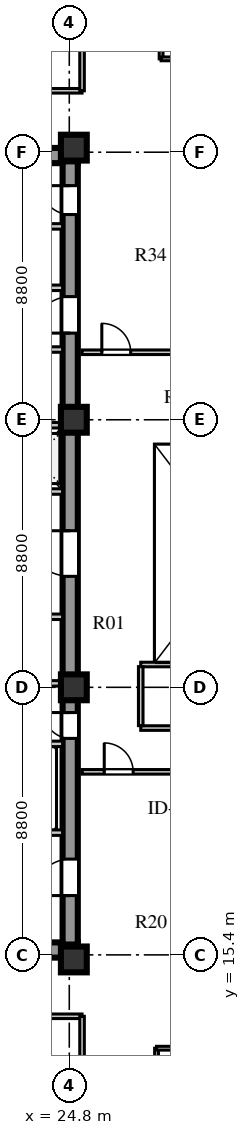
"""IFC4 building model, lengths in metres.
Left out: names, types, materials, properties, quantities, classifications, styles, units other than length and angle.
Written with IfcOpenShell. Run it as: python <this file> out.ifc"""

import sys

from ifc_helpers import new_model, si_unit, direction, frame, frame_2d, origin, origin_2d, place, context, subcontext, project, spatial, rectangle, extrude, element, fill, save


model = new_model("IFC4")
c1 = context("Model", 3, precision=1e-05, world=origin(), true_north=direction((0.0, 1.0)))
c2 = subcontext(c1, "Body", "Model", "MODEL_VIEW")
j1 = project(units=[si_unit("LENGTHUNIT", "METRE"), si_unit("PLANEANGLEUNIT", "RADIAN")], contexts=[c1])
p1 = place(None, origin())
s1 = spatial("IfcSite", under=j1, at=p1, CompositionType="ELEMENT")
p2 = place(p1, origin())
s2 = spatial("IfcBuilding", under=s1, at=p2, CompositionType="ELEMENT")
p3 = place(p2, frame((0.0, 0.0, 127.1)))
s3 = spatial("IfcBuildingStorey", under=s2, at=p3, CompositionType="ELEMENT", Elevation=127.1)
for number, where, z_axis, x_axis in (
    (1, (15.4, 15.56, 0.0), (0.0, 0.0, 1.0), (1.0, 0.0, 0.0)),
    (2, (15.4, 41.69, 0.0), (0.0, 0.0, 1.0), (1.0, 0.0, 0.0)),
):
    element("IfcWall", number, at=place(p3, frame(where, z_axis=z_axis, x_axis=x_axis)), inside=s3, PredefinedType="SHEAR", context=c2, shape_type="SweptSolid", body=[
        extrude(rectangle(XDim=9.68, YDim=0.5, at=frame_2d((4.84, 0.0))), origin(), (0.0, 0.0, 1.0), 3.6),
    ])
p4 = place(p3, frame((24.83, 15.74, 0.0), z_axis=(0.0, 0.0, 1.0), x_axis=(0.0, 1.0, 0.0)))
e3 = element("IfcWall", 3, at=p4, inside=s3, PredefinedType="SHEAR", context=c2, shape_type="SweptSolid", body=[
    extrude(rectangle(XDim=25.76, YDim=0.5, at=frame_2d((12.88, 0.0))), origin(), (0.0, 0.0, 1.0), 3.6),
])
p5 = place(p4, frame((1.61, 0.0, 0.0)))
e4 = element("IfcOpeningElement", 4, at=p5, cuts=e3, PredefinedType="OPENING", context=c2, shape_type="SweptSolid", body=[
    extrude(rectangle(XDim=1.2, YDim=2.1, at=frame_2d((0.6, 1.05))), frame((0.0, 0.26, 0.0), z_axis=(0.0, -1.0, 0.0), x_axis=(1.0, 0.0, 0.0)), (0.0, 0.0, 1.0), 0.52),
])
p6 = place(p4, frame((6.78, 0.0, 0.0)))
e5 = element("IfcOpeningElement", 5, at=p6, cuts=e3, PredefinedType="OPENING", context=c2, shape_type="SweptSolid", body=[
    extrude(rectangle(XDim=0.85, YDim=2.06, at=frame_2d((0.425, 1.03))), frame((0.0, 0.26, 0.0), z_axis=(0.0, -1.0, 0.0), x_axis=(1.0, 0.0, 0.0)), (0.0, 0.0, 1.0), 0.52),
])
p7 = place(p4, frame((12.11, 0.0, 0.0)))
e6 = element("IfcOpeningElement", 6, at=p7, cuts=e3, PredefinedType="OPENING", context=c2, shape_type="SweptSolid", body=[
    extrude(rectangle(XDim=1.5, YDim=2.12, at=frame_2d((0.75, 1.06))), frame((0.0, 0.26, 0.0), z_axis=(0.0, -1.0, 0.0), x_axis=(1.0, 0.0, 0.0)), (0.0, 0.0, 1.0), 0.52),
])
p8 = place(p4, frame((20.11, 0.0, 0.0)))
e7 = element("IfcOpeningElement", 7, at=p8, cuts=e3, PredefinedType="OPENING", context=c2, shape_type="SweptSolid", body=[
    extrude(rectangle(XDim=1.2, YDim=2.12, at=frame_2d((0.6, 1.06))), frame((0.0, 0.26, 0.0), z_axis=(0.0, -1.0, 0.0), x_axis=(1.0, 0.0, 0.0)), (0.0, 0.0, 1.0), 0.52),
])
p9 = place(p4, frame((24.01, 0.0, 0.0)))
e8 = element("IfcOpeningElement", 8, at=p9, cuts=e3, PredefinedType="OPENING", context=c2, shape_type="SweptSolid", body=[
    extrude(rectangle(XDim=0.95, YDim=2.1, at=frame_2d((0.475, 1.05))), frame((0.0, 0.26, 0.0), z_axis=(0.0, -1.0, 0.0), x_axis=(1.0, 0.0, 0.0)), (0.0, 0.0, 1.0), 0.52),
])
for number, where, z_axis, x_axis in (
    (9, (24.95, 15.25, 0.0), (0.0, 0.0, 1.0), (1.0, 0.0, 0.0)),
    (10, (24.95, 24.2, 0.0), (0.0, 0.0, 1.0), (1.0, 0.0, 0.0)),
    (11, (24.95, 33.0, 0.0), (0.0, 0.0, 1.0), (1.0, 0.0, 0.0)),
    (12, (24.95, 41.95, 0.0), (0.0, 0.0, 1.0), (1.0, 0.0, 0.0)),
):
    element("IfcColumn", number, at=place(p3, frame(where, z_axis=z_axis, x_axis=x_axis)), inside=s3, PredefinedType="COLUMN", context=c2, shape_type="SweptSolid", body=[
        extrude(rectangle(XDim=0.85, YDim=0.85, at=origin_2d()), origin(), (0.0, 0.0, 1.0), 3.6),
    ])
p10 = place(p3, frame((19.64, 19.42, 0.0), z_axis=(0.0, 0.0, 1.0), x_axis=(1.0, 0.0, 0.0)))
e13 = element("IfcWall", 13, at=p10, inside=s3, PredefinedType="SOLIDWALL", context=c2, shape_type="SweptSolid", body=[
    extrude(rectangle(XDim=4.94, YDim=0.18, at=frame_2d((2.47, 0.0))), origin(), (0.0, 0.0, 1.0), 3.6),
])
p11 = place(p10, frame((0.72, 0.0, 0.0)))
e14 = element("IfcOpeningElement", 14, at=p11, cuts=e13, PredefinedType="OPENING", context=c2, shape_type="SweptSolid", body=[
    extrude(rectangle(XDim=1.1, YDim=2.1, at=frame_2d((0.55, 1.05))), frame((0.0, 0.1, 0.0), z_axis=(0.0, -1.0, 0.0), x_axis=(1.0, 0.0, 0.0)), (0.0, 0.0, 1.0), 0.2),
])
p12 = place(p10, frame((3.02, 0.0, 0.0)))
e15 = element("IfcOpeningElement", 15, at=p12, cuts=e13, PredefinedType="OPENING", context=c2, shape_type="SweptSolid", body=[
    extrude(rectangle(XDim=1.1, YDim=2.1, at=frame_2d((0.55, 1.05))), frame((0.0, 0.1, 0.0), z_axis=(0.0, -1.0, 0.0), x_axis=(1.0, 0.0, 0.0)), (0.0, 0.0, 1.0), 0.2),
])
p13 = place(p3, frame((19.64, 22.34, 0.0), z_axis=(0.0, 0.0, 1.0), x_axis=(1.0, 0.0, 0.0)))
e16 = element("IfcWall", 16, at=p13, inside=s3, PredefinedType="SOLIDWALL", context=c2, shape_type="SweptSolid", body=[
    extrude(rectangle(XDim=4.94, YDim=0.18, at=frame_2d((2.47, 0.0))), origin(), (0.0, 0.0, 1.0), 3.6),
])
p14 = place(p3, frame((15.9, 26.52, 0.0), z_axis=(0.0, 0.0, 1.0), x_axis=(1.0, 0.0, 0.0)))
e17 = element("IfcWall", 17, at=p14, inside=s3, PredefinedType="SOLIDWALL", context=c2, shape_type="SweptSolid", body=[
    extrude(rectangle(XDim=8.68, YDim=0.18, at=frame_2d((4.34, 0.0))), origin(), (0.0, 0.0, 1.0), 3.6),
])
p15 = place(p14, frame((3.3, 0.0, 0.0)))
e18 = element("IfcOpeningElement", 18, at=p15, cuts=e17, PredefinedType="OPENING", context=c2, shape_type="SweptSolid", body=[
    extrude(rectangle(XDim=0.95, YDim=2.1, at=frame_2d((0.475, 1.05))), frame((0.0, 0.1, 0.0), z_axis=(0.0, -1.0, 0.0), x_axis=(1.0, 0.0, 0.0)), (0.0, 0.0, 1.0), 0.2),
])
p16 = place(p3, frame((15.9, 24.33, 0.0), z_axis=(0.0, 0.0, 1.0), x_axis=(1.0, 0.0, 0.0)))
e19 = element("IfcWall", 19, at=p16, inside=s3, PredefinedType="SOLIDWALL", context=c2, shape_type="SweptSolid", body=[
    extrude(rectangle(XDim=8.68, YDim=0.18, at=frame_2d((4.34, 0.0))), origin(), (0.0, 0.0, 1.0), 2.95),
])
p17 = place(p3, frame((15.9, 30.64, 0.0), z_axis=(0.0, 0.0, 1.0), x_axis=(1.0, 0.0, 0.0)))
e20 = element("IfcWall", 20, at=p17, inside=s3, PredefinedType="SOLIDWALL", context=c2, shape_type="SweptSolid", body=[
    extrude(rectangle(XDim=8.68, YDim=0.18, at=frame_2d((4.34, 0.0))), origin(), (0.0, 0.0, 1.0), 3.6),
])
p18 = place(p17, frame((1.76, 0.0, 0.0)))
e21 = element("IfcOpeningElement", 21, at=p18, cuts=e20, PredefinedType="OPENING", context=c2, shape_type="SweptSolid", body=[
    extrude(rectangle(XDim=1.0, YDim=2.1, at=frame_2d((0.5, 1.05))), frame((0.0, 0.1, 0.0), z_axis=(0.0, -1.0, 0.0), x_axis=(1.0, 0.0, 0.0)), (0.0, 0.0, 1.0), 0.2),
])
p19 = place(p17, frame((3.6, 0.0, 0.0)))
e22 = element("IfcOpeningElement", 22, at=p19, cuts=e20, PredefinedType="OPENING", context=c2, shape_type="SweptSolid", body=[
    extrude(rectangle(XDim=1.0, YDim=2.1, at=frame_2d((0.5, 1.05))), frame((0.0, 0.1, 0.0), z_axis=(0.0, -1.0, 0.0), x_axis=(1.0, 0.0, 0.0)), (0.0, 0.0, 1.0), 0.2),
])
p20 = place(p17, frame((5.44, 0.0, 0.0)))
e23 = element("IfcOpeningElement", 23, at=p20, cuts=e20, PredefinedType="OPENING", context=c2, shape_type="SweptSolid", body=[
    extrude(rectangle(XDim=1.0, YDim=2.1, at=frame_2d((0.5, 1.05))), frame((0.0, 0.1, 0.0), z_axis=(0.0, -1.0, 0.0), x_axis=(1.0, 0.0, 0.0)), (0.0, 0.0, 1.0), 0.2),
])
p21 = place(p17, frame((7.28, 0.0, 0.0)))
e24 = element("IfcOpeningElement", 24, at=p21, cuts=e20, PredefinedType="OPENING", context=c2, shape_type="SweptSolid", body=[
    extrude(rectangle(XDim=1.0, YDim=2.1, at=frame_2d((0.5, 1.05))), frame((0.0, 0.1, 0.0), z_axis=(0.0, -1.0, 0.0), x_axis=(1.0, 0.0, 0.0)), (0.0, 0.0, 1.0), 0.2),
])
p22 = place(p3, frame((15.9, 32.82, 0.0), z_axis=(0.0, 0.0, 1.0), x_axis=(1.0, 0.0, 0.0)))
e25 = element("IfcWall", 25, at=p22, inside=s3, PredefinedType="SOLIDWALL", context=c2, shape_type="SweptSolid", body=[
    extrude(rectangle(XDim=8.68, YDim=0.18, at=frame_2d((4.34, 0.0))), origin(), (0.0, 0.0, 1.0), 2.95),
])
p23 = place(p3, frame((22.02, 35.31, 0.0), z_axis=(0.0, 0.0, 1.0), x_axis=(1.0, 0.0, 0.0)))
e26 = element("IfcWall", 26, at=p23, inside=s3, PredefinedType="SOLIDWALL", context=c2, shape_type="SweptSolid", body=[
    extrude(rectangle(XDim=2.56, YDim=0.18, at=frame_2d((1.28, 0.0))), origin(), (0.0, 0.0, 1.0), 3.6),
])
p24 = place(p23, frame((0.55, 0.0, 0.0)))
e27 = element("IfcOpeningElement", 27, at=p24, cuts=e26, PredefinedType="OPENING", context=c2, shape_type="SweptSolid", body=[
    extrude(rectangle(XDim=1.0, YDim=2.1, at=frame_2d((0.5, 1.05))), frame((0.0, 0.1, 0.0), z_axis=(0.0, -1.0, 0.0), x_axis=(1.0, 0.0, 0.0)), (0.0, 0.0, 1.0), 0.2),
])
p25 = place(p3, frame((19.64, 37.34, 0.0), z_axis=(0.0, 0.0, 1.0), x_axis=(1.0, 0.0, 0.0)))
e28 = element("IfcWall", 28, at=p25, inside=s3, PredefinedType="SOLIDWALL", context=c2, shape_type="SweptSolid", body=[
    extrude(rectangle(XDim=4.94, YDim=0.18, at=frame_2d((2.47, 0.0))), origin(), (0.0, 0.0, 1.0), 3.6),
])
p26 = place(p25, frame((0.45, 0.0, 0.0)))
e29 = element("IfcOpeningElement", 29, at=p26, cuts=e28, PredefinedType="OPENING", context=c2, shape_type="SweptSolid", body=[
    extrude(rectangle(XDim=1.0, YDim=2.1, at=frame_2d((0.5, 1.05))), frame((0.0, 0.1, 0.0), z_axis=(0.0, -1.0, 0.0), x_axis=(1.0, 0.0, 0.0)), (0.0, 0.0, 1.0), 0.2),
])
p27 = place(p25, frame((2.5, 0.0, 0.0)))
e30 = element("IfcOpeningElement", 30, at=p27, cuts=e28, PredefinedType="OPENING", context=c2, shape_type="SweptSolid", body=[
    extrude(rectangle(XDim=1.0, YDim=2.1, at=frame_2d((0.5, 1.05))), frame((0.0, 0.1, 0.0), z_axis=(0.0, -1.0, 0.0), x_axis=(1.0, 0.0, 0.0)), (0.0, 0.0, 1.0), 0.2),
])
p28 = place(p3, frame((19.64, 39.36, 0.0), z_axis=(0.0, 0.0, 1.0), x_axis=(1.0, 0.0, 0.0)))
e31 = element("IfcWall", 31, at=p28, inside=s3, PredefinedType="SOLIDWALL", context=c2, shape_type="SweptSolid", body=[
    extrude(rectangle(XDim=4.94, YDim=0.18, at=frame_2d((2.47, 0.0))), origin(), (0.0, 0.0, 1.0), 3.6),
])
p29 = place(p3, frame((25.22, 21.42, 0.0), z_axis=(0.0, 0.0, 1.0), x_axis=(1.0, 0.0, 0.0)))
e32 = element("IfcWall", 32, at=p29, inside=s3, PredefinedType="PARTITIONING", context=c2, shape_type="SweptSolid", body=[
    extrude(rectangle(XDim=15.6, YDim=0.15, at=frame_2d((7.8, 0.0))), origin(), (0.0, 0.0, 1.0), 3.2),
])
p30 = place(p29, frame((0.73, 0.0, 0.0)))
e33 = element("IfcOpeningElement", 33, at=p30, cuts=e32, PredefinedType="OPENING", context=c2, shape_type="SweptSolid", body=[
    extrude(rectangle(XDim=0.95, YDim=2.1, at=frame_2d((0.475, 1.05))), frame((0.0, 0.085, 0.0), z_axis=(0.0, -1.0, 0.0), x_axis=(1.0, 0.0, 0.0)), (0.0, 0.0, 1.0), 0.17),
])
p31 = place(p29, frame((5.23, 0.0, 0.0)))
e34 = element("IfcOpeningElement", 34, at=p31, cuts=e32, PredefinedType="OPENING", context=c2, shape_type="SweptSolid", body=[
    extrude(rectangle(XDim=0.95, YDim=2.1, at=frame_2d((0.475, 1.05))), frame((0.0, 0.085, 0.0), z_axis=(0.0, -1.0, 0.0), x_axis=(1.0, 0.0, 0.0)), (0.0, 0.0, 1.0), 0.17),
])
p32 = place(p29, frame((10.83, 0.0, 0.0)))
e35 = element("IfcOpeningElement", 35, at=p32, cuts=e32, PredefinedType="OPENING", context=c2, shape_type="SweptSolid", body=[
    extrude(rectangle(XDim=0.95, YDim=2.1, at=frame_2d((0.475, 1.05))), frame((0.0, 0.085, 0.0), z_axis=(0.0, -1.0, 0.0), x_axis=(1.0, 0.0, 0.0)), (0.0, 0.0, 1.0), 0.17),
])
p33 = place(p3, frame((27.15, 22.86, 0.0), z_axis=(0.0, 0.0, 1.0), x_axis=(1.0, 0.0, 0.0)))
e36 = element("IfcWall", 36, at=p33, inside=s3, PredefinedType="PARTITIONING", context=c2, shape_type="SweptSolid", body=[
    extrude(rectangle(XDim=13.67, YDim=0.15, at=frame_2d((6.835, 0.0))), origin(), (0.0, 0.0, 1.0), 3.6),
])
p34 = place(p33, frame((2.2, 0.0, 0.0)))
e37 = element("IfcOpeningElement", 37, at=p34, cuts=e36, PredefinedType="OPENING", context=c2, shape_type="SweptSolid", body=[
    extrude(rectangle(XDim=0.9, YDim=2.08, at=frame_2d((0.45, 1.04))), frame((0.0, 0.085, 0.0), z_axis=(0.0, -1.0, 0.0), x_axis=(1.0, 0.0, 0.0)), (0.0, 0.0, 1.0), 0.17),
])
p35 = place(p3, frame((25.22, 35.22, 0.0), z_axis=(0.0, 0.0, 1.0), x_axis=(1.0, 0.0, 0.0)))
e38 = element("IfcWall", 38, at=p35, inside=s3, PredefinedType="PARTITIONING", context=c2, shape_type="SweptSolid", body=[
    extrude(rectangle(XDim=9.5, YDim=0.15, at=frame_2d((4.75, 0.0))), origin(), (0.0, 0.0, 1.0), 3.6),
])
p36 = place(p35, frame((0.65, 0.0, 0.0)))
e39 = element("IfcOpeningElement", 39, at=p36, cuts=e38, PredefinedType="OPENING", context=c2, shape_type="SweptSolid", body=[
    extrude(rectangle(XDim=0.95, YDim=2.1, at=frame_2d((0.475, 1.05))), frame((0.0, 0.085, 0.0), z_axis=(0.0, -1.0, 0.0), x_axis=(1.0, 0.0, 0.0)), (0.0, 0.0, 1.0), 0.17),
])
p37 = place(p35, frame((5.2, 0.0, 0.0)))
e40 = element("IfcOpeningElement", 40, at=p37, cuts=e38, PredefinedType="OPENING", context=c2, shape_type="SweptSolid", body=[
    extrude(rectangle(XDim=0.95, YDim=2.1, at=frame_2d((0.475, 1.05))), frame((0.0, 0.085, 0.0), z_axis=(0.0, -1.0, 0.0), x_axis=(1.0, 0.0, 0.0)), (0.0, 0.0, 1.0), 0.17),
])
p38 = place(p3, frame((13.59, 13.38, 0.0), z_axis=(0.0, 0.0, 1.0), x_axis=(1.0, 0.0, 0.0)))
e41 = element("IfcWall", 41, at=p38, inside=s3, PredefinedType="PARTITIONING", context=c2, shape_type="SweptSolid", body=[
    extrude(rectangle(XDim=11.63, YDim=0.15, at=frame_2d((5.815, 0.0))), origin(), (0.0, 0.0, 1.0), 3.6),
])
p39 = place(p38, frame((4.56, 0.0, 0.0)))
e42 = element("IfcOpeningElement", 42, at=p39, cuts=e41, PredefinedType="OPENING", context=c2, shape_type="SweptSolid", body=[
    extrude(rectangle(XDim=1.0, YDim=2.08, at=frame_2d((0.5, 1.04))), frame((0.0, 0.085, 0.0), z_axis=(0.0, -1.0, 0.0), x_axis=(1.0, 0.0, 0.0)), (0.0, 0.0, 1.0), 0.17),
])
p40 = place(p3, frame((25.22, 10.28, 0.0), z_axis=(0.0, 0.0, 1.0), x_axis=(0.0, 1.0, 0.0)))
e43 = element("IfcWall", 43, at=p40, inside=s3, PredefinedType="PARTITIONING", context=c2, shape_type="SweptSolid", body=[
    extrude(rectangle(XDim=3.1, YDim=0.15, at=frame_2d((1.55, 0.0))), origin(), (0.0, 0.0, 1.0), 3.1),
])
p41 = place(p3, frame((13.59, 43.82, 0.0), z_axis=(0.0, 0.0, 1.0), x_axis=(1.0, 0.0, 0.0)))
e44 = element("IfcWall", 44, at=p41, inside=s3, PredefinedType="PARTITIONING", context=c2, shape_type="SweptSolid", body=[
    extrude(rectangle(XDim=11.63, YDim=0.15, at=frame_2d((5.815, 0.0))), origin(), (0.0, 0.0, 1.0), 3.6),
])
p42 = place(p41, frame((4.56, 0.0, 0.0)))
e45 = element("IfcOpeningElement", 45, at=p42, cuts=e44, PredefinedType="OPENING", context=c2, shape_type="SweptSolid", body=[
    extrude(rectangle(XDim=1.0, YDim=2.08, at=frame_2d((0.5, 1.04))), frame((0.0, 0.085, 0.0), z_axis=(0.0, -1.0, 0.0), x_axis=(1.0, 0.0, 0.0)), (0.0, 0.0, 1.0), 0.17),
])
p43 = place(p3, frame((25.22, 43.82, 0.0), z_axis=(0.0, 0.0, 1.0), x_axis=(0.0, 1.0, 0.0)))
e46 = element("IfcWall", 46, at=p43, inside=s3, PredefinedType="PARTITIONING", context=c2, shape_type="SweptSolid", body=[
    extrude(rectangle(XDim=3.1, YDim=0.15, at=frame_2d((1.55, 0.0))), origin(), (0.0, 0.0, 1.0), 3.1),
])
p44 = place(p3, frame((27.15, 24.95, 0.0), z_axis=(0.0, 0.0, 1.0), x_axis=(1.0, 0.0, 0.0)))
e47 = element("IfcWall", 47, at=p44, inside=s3, PredefinedType="PARTITIONING", context=c2, shape_type="SweptSolid", body=[
    extrude(rectangle(XDim=9.67, YDim=0.15, at=frame_2d((4.835, 0.0))), origin(), (0.0, 0.0, 1.0), 3.05),
])
p45 = place(p3, frame((27.15, 22.94, 0.0), z_axis=(0.0, 0.0, 1.0), x_axis=(0.0, 1.0, 0.0)))
e48 = element("IfcWall", 48, at=p45, inside=s3, PredefinedType="PARTITIONING", context=c2, shape_type="SweptSolid", body=[
    extrude(rectangle(XDim=1.94, YDim=0.15, at=frame_2d((0.97, 0.0))), origin(), (0.0, 0.0, 1.0), 3.6),
])
p46 = place(p3, frame((27.67, 10.28, 0.0), z_axis=(0.0, 0.0, 1.0), x_axis=(0.0, 1.0, 0.0)))
e49 = element("IfcWall", 49, at=p46, inside=s3, PredefinedType="PLUMBINGWALL", context=c2, shape_type="SweptSolid", body=[
    extrude(rectangle(XDim=2.05, YDim=0.125, at=frame_2d((1.025, 0.0))), origin(), (0.0, 0.0, 1.0), 3.6),
])
p47 = place(p3, frame((27.67, 12.33, 0.0), z_axis=(0.0, 0.0, 1.0), x_axis=(1.0, 0.0, 0.0)))
e50 = element("IfcWall", 50, at=p47, inside=s3, PredefinedType="PLUMBINGWALL", context=c2, shape_type="SweptSolid", body=[
    extrude(rectangle(XDim=2.05, YDim=0.125, at=frame_2d((1.025, 0.0))), origin(), (0.0, 0.0, 1.0), 3.6),
])
p48 = place(p47, frame((0.55, 0.0, 0.0)))
e51 = element("IfcOpeningElement", 51, at=p48, cuts=e50, PredefinedType="OPENING", context=c2, shape_type="SweptSolid", body=[
    extrude(rectangle(XDim=0.8, YDim=2.05, at=frame_2d((0.4, 1.025))), frame((0.0, 0.073, 0.0), z_axis=(0.0, -1.0, 0.0), x_axis=(1.0, 0.0, 0.0)), (0.0, 0.0, 1.0), 0.145),
])
p49 = place(p3, frame((27.82, 44.87, 0.0), z_axis=(0.0, 0.0, 1.0), x_axis=(0.0, 1.0, 0.0)))
e52 = element("IfcWall", 52, at=p49, inside=s3, PredefinedType="PLUMBINGWALL", context=c2, shape_type="SweptSolid", body=[
    extrude(rectangle(XDim=2.05, YDim=0.125, at=frame_2d((1.025, 0.0))), origin(), (0.0, 0.0, 1.0), 3.6),
])
p50 = place(p3, frame((27.82, 44.87, 0.0), z_axis=(0.0, 0.0, 1.0), x_axis=(1.0, 0.0, 0.0)))
e53 = element("IfcWall", 53, at=p50, inside=s3, PredefinedType="PLUMBINGWALL", context=c2, shape_type="SweptSolid", body=[
    extrude(rectangle(XDim=2.05, YDim=0.125, at=frame_2d((1.025, 0.0))), origin(), (0.0, 0.0, 1.0), 3.6),
])
p51 = place(p50, frame((0.55, 0.0, 0.0)))
e54 = element("IfcOpeningElement", 54, at=p51, cuts=e53, PredefinedType="OPENING", context=c2, shape_type="SweptSolid", body=[
    extrude(rectangle(XDim=0.8, YDim=2.05, at=frame_2d((0.4, 1.025))), frame((0.0, 0.073, 0.0), z_axis=(0.0, -1.0, 0.0), x_axis=(1.0, 0.0, 0.0)), (0.0, 0.0, 1.0), 0.145),
])
p52 = place(p5, frame((1.2, 0.0, 0.0), z_axis=(0.0, 0.0, 1.0), x_axis=(-1.0, 0.0, 0.0)))
e55 = element("IfcDoor", 55, at=p52, inside=s3, OperationType="SINGLE_SWING_RIGHT", PredefinedType="DOOR", context=c2, shape_type="SweptSolid", body=[
    extrude(rectangle(XDim=1.2, YDim=2.1, at=frame_2d((0.6, 1.05))), frame((0.0, 0.025, 0.0), z_axis=(0.0, -1.0, 0.0), x_axis=(1.0, 0.0, 0.0)), (0.0, 0.0, 1.0), 0.05),
])
fill(e4, e55)
p53 = place(p6, frame((0.85, 0.0, 0.0), z_axis=(0.0, 0.0, 1.0), x_axis=(-1.0, 0.0, 0.0)))
e56 = element("IfcDoor", 56, at=p53, inside=s3, OperationType="SINGLE_SWING_LEFT", PredefinedType="DOOR", context=c2, shape_type="SweptSolid", body=[
    extrude(rectangle(XDim=0.85, YDim=2.06, at=frame_2d((0.425, 1.03))), frame((0.0, 0.025, 0.0), z_axis=(0.0, -1.0, 0.0), x_axis=(1.0, 0.0, 0.0)), (0.0, 0.0, 1.0), 0.05),
])
fill(e5, e56)
p54 = place(p7, frame((1.5, 0.0, 0.0), z_axis=(0.0, 0.0, 1.0), x_axis=(-1.0, 0.0, 0.0)))
e57 = element("IfcDoor", 57, at=p54, inside=s3, OperationType="SINGLE_SWING_LEFT", PredefinedType="DOOR", context=c2, shape_type="SweptSolid", body=[
    extrude(rectangle(XDim=1.5, YDim=2.12, at=frame_2d((0.75, 1.06))), frame((0.0, 0.025, 0.0), z_axis=(0.0, -1.0, 0.0), x_axis=(1.0, 0.0, 0.0)), (0.0, 0.0, 1.0), 0.05),
])
fill(e6, e57)
p55 = place(p8, frame((1.2, 0.0, 0.0), z_axis=(0.0, 0.0, 1.0), x_axis=(-1.0, 0.0, 0.0)))
e58 = element("IfcDoor", 58, at=p55, inside=s3, OperationType="SINGLE_SWING_RIGHT", PredefinedType="DOOR", context=c2, shape_type="SweptSolid", body=[
    extrude(rectangle(XDim=1.2, YDim=2.12, at=frame_2d((0.6, 1.06))), frame((0.0, 0.025, 0.0), z_axis=(0.0, -1.0, 0.0), x_axis=(1.0, 0.0, 0.0)), (0.0, 0.0, 1.0), 0.05),
])
fill(e7, e58)
p56 = place(p9, frame((0.95, 0.0, 0.0), z_axis=(0.0, 0.0, 1.0), x_axis=(-1.0, 0.0, 0.0)))
e59 = element("IfcDoor", 59, at=p56, inside=s3, OperationType="SINGLE_SWING_LEFT", PredefinedType="DOOR", context=c2, shape_type="SweptSolid", body=[
    extrude(rectangle(XDim=0.95, YDim=2.1, at=frame_2d((0.475, 1.05))), frame((0.0, 0.025, 0.0), z_axis=(0.0, -1.0, 0.0), x_axis=(1.0, 0.0, 0.0)), (0.0, 0.0, 1.0), 0.05),
])
fill(e8, e59)
p57 = place(p30, frame((0.95, 0.0, 0.0), z_axis=(0.0, 0.0, 1.0), x_axis=(-1.0, 0.0, 0.0)))
e60 = element("IfcDoor", 60, at=p57, inside=s3, OperationType="SINGLE_SWING_RIGHT", PredefinedType="DOOR", context=c2, shape_type="SweptSolid", body=[
    extrude(rectangle(XDim=0.95, YDim=2.1, at=frame_2d((0.475, 1.05))), frame((0.0, 0.025, 0.0), z_axis=(0.0, -1.0, 0.0), x_axis=(1.0, 0.0, 0.0)), (0.0, 0.0, 1.0), 0.05),
])
fill(e33, e60)
p58 = place(p36, origin())
e61 = element("IfcDoor", 61, at=p58, inside=s3, OperationType="SINGLE_SWING_LEFT", PredefinedType="DOOR", context=c2, shape_type="SweptSolid", body=[
    extrude(rectangle(XDim=0.95, YDim=2.1, at=frame_2d((0.475, 1.05))), frame((0.0, 0.025, 0.0), z_axis=(0.0, -1.0, 0.0), x_axis=(1.0, 0.0, 0.0)), (0.0, 0.0, 1.0), 0.05),
])
fill(e39, e61)
save(model, sys.argv[1])
